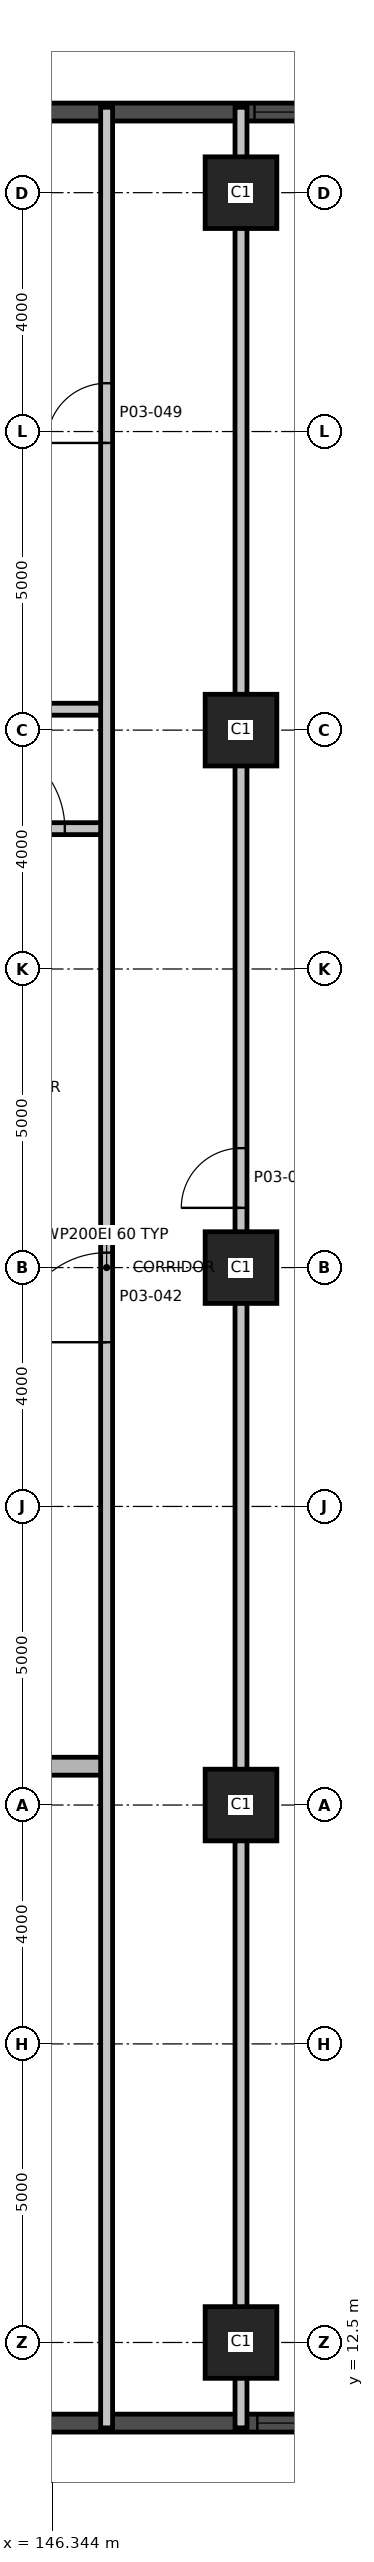
"""IFC4 building model, lengths in metres.
Left out: names, types, materials, properties, quantities, classifications, styles, units other than length and angle.
Written with IfcOpenShell. Run it as: python <this file> out.ifc"""

import sys

from ifc_helpers import new_model, si_unit, direction, frame, frame_2d, origin, origin_2d, place, context, subcontext, project, spatial, rectangle, extrude, element, fill, save


model = new_model("IFC4")
c1 = context("Model", 3, precision=1e-05, world=origin(), true_north=direction((0.0, 1.0)))
c2 = subcontext(c1, "Body", "Model", "MODEL_VIEW")
j1 = project(units=[si_unit("LENGTHUNIT", "METRE"), si_unit("PLANEANGLEUNIT", "RADIAN")], contexts=[c1])
p1 = place(None, origin())
s1 = spatial("IfcSite", under=j1, at=p1, CompositionType="ELEMENT")
p2 = place(p1, origin())
s2 = spatial("IfcBuilding", under=s1, at=p2, CompositionType="ELEMENT")
p3 = place(p2, frame((0.0, 0.0, 18.5)))
s3 = spatial("IfcBuildingStorey", under=s2, at=p3, CompositionType="ELEMENT", Elevation=18.5)
for number, where, z_axis, x_axis in (
    (1, (149.5, 12.5, 0.0), (0.0, 0.0, 1.0), (1.0, 0.0, 0.0)),
    (2, (149.5, 21.5, 0.0), (0.0, 0.0, 1.0), (1.0, 0.0, 0.0)),
    (3, (149.5, 30.5, 0.0), (0.0, 0.0, 1.0), (1.0, 0.0, 0.0)),
    (4, (149.5, 39.5, 0.0), (0.0, 0.0, 1.0), (1.0, 0.0, 0.0)),
    (5, (149.5, 48.5, 0.0), (0.0, 0.0, 1.0), (1.0, 0.0, 0.0)),
):
    element("IfcColumn", number, at=place(p3, frame(where, z_axis=z_axis, x_axis=x_axis)), inside=s3, PredefinedType="COLUMN", context=c2, shape_type="SweptSolid", body=[
        extrude(rectangle(XDim=1.2, YDim=1.2, at=origin_2d()), origin(), (0.0, 0.0, 1.0), 5.0),
    ])
p4 = place(p3, frame((118.048, 11.15, 0.0), z_axis=(0.0, 0.0, 1.0), x_axis=(1.0, 0.0, 0.0)))
e6 = element("IfcWall", 6, at=p4, inside=s3, PredefinedType="SOLIDWALL", context=c2, shape_type="SweptSolid", body=[
    extrude(rectangle(XDim=35.88, YDim=0.3, at=frame_2d((17.94, 0.0))), origin(), (0.0, 0.0, 1.0), 4.7),
])
p5 = place(p4, frame((4.202, 0.0, 0.9)))
e7 = element("IfcOpeningElement", 7, at=p5, cuts=e6, PredefinedType="OPENING", context=c2, shape_type="SweptSolid", body=[
    extrude(rectangle(XDim=3.0, YDim=2.4, at=frame_2d((1.5, 1.2))), frame((0.0, 0.16, 0.0), z_axis=(0.0, -1.0, 0.0), x_axis=(1.0, 0.0, 0.0)), (0.0, 0.0, 1.0), 0.32),
])
p6 = place(p4, frame((8.702, 0.0, 0.9)))
e8 = element("IfcOpeningElement", 8, at=p6, cuts=e6, PredefinedType="OPENING", context=c2, shape_type="SweptSolid", body=[
    extrude(rectangle(XDim=3.0, YDim=2.4, at=frame_2d((1.5, 1.2))), frame((0.0, 0.16, 0.0), z_axis=(0.0, -1.0, 0.0), x_axis=(1.0, 0.0, 0.0)), (0.0, 0.0, 1.0), 0.32),
])
p7 = place(p4, frame((13.202, 0.0, 0.9)))
e9 = element("IfcOpeningElement", 9, at=p7, cuts=e6, PredefinedType="OPENING", context=c2, shape_type="SweptSolid", body=[
    extrude(rectangle(XDim=3.0, YDim=2.4, at=frame_2d((1.5, 1.2))), frame((0.0, 0.16, 0.0), z_axis=(0.0, -1.0, 0.0), x_axis=(1.0, 0.0, 0.0)), (0.0, 0.0, 1.0), 0.32),
])
p8 = place(p4, frame((17.702, 0.0, 0.9)))
e10 = element("IfcOpeningElement", 10, at=p8, cuts=e6, PredefinedType="OPENING", context=c2, shape_type="SweptSolid", body=[
    extrude(rectangle(XDim=3.0, YDim=2.4, at=frame_2d((1.5, 1.2))), frame((0.0, 0.16, 0.0), z_axis=(0.0, -1.0, 0.0), x_axis=(1.0, 0.0, 0.0)), (0.0, 0.0, 1.0), 0.32),
])
p9 = place(p4, frame((22.202, 0.0, 0.9)))
e11 = element("IfcOpeningElement", 11, at=p9, cuts=e6, PredefinedType="OPENING", context=c2, shape_type="SweptSolid", body=[
    extrude(rectangle(XDim=3.0, YDim=2.4, at=frame_2d((1.5, 1.2))), frame((0.0, 0.16, 0.0), z_axis=(0.0, -1.0, 0.0), x_axis=(1.0, 0.0, 0.0)), (0.0, 0.0, 1.0), 0.32),
])
p10 = place(p4, frame((31.726, 0.0, 0.9)))
e12 = element("IfcOpeningElement", 12, at=p10, cuts=e6, PredefinedType="OPENING", context=c2, shape_type="SweptSolid", body=[
    extrude(rectangle(XDim=3.0, YDim=2.4, at=frame_2d((1.5, 1.2))), frame((0.0, 0.16, 0.0), z_axis=(0.0, -1.0, 0.0), x_axis=(1.0, 0.0, 0.0)), (0.0, 0.0, 1.0), 0.32),
])
p11 = place(p3, frame((153.952, 49.85, 0.0), z_axis=(0.0, 0.0, 1.0), x_axis=(-1.0, 0.0, 0.0)))
e13 = element("IfcWall", 13, at=p11, inside=s3, PredefinedType="SOLIDWALL", context=c2, shape_type="SweptSolid", body=[
    extrude(rectangle(XDim=35.88, YDim=0.3, at=frame_2d((17.94, 0.0))), origin(), (0.0, 0.0, 1.0), 4.7),
])
p12 = place(p11, frame((1.226, 0.0, 0.9)))
e14 = element("IfcOpeningElement", 14, at=p12, cuts=e13, PredefinedType="OPENING", context=c2, shape_type="SweptSolid", body=[
    extrude(rectangle(XDim=3.0, YDim=2.4, at=frame_2d((1.5, 1.2))), frame((0.0, 0.16, 0.0), z_axis=(0.0, -1.0, 0.0), x_axis=(1.0, 0.0, 0.0)), (0.0, 0.0, 1.0), 0.32),
])
p13 = place(p11, frame((15.202, 0.0, 0.9)))
e15 = element("IfcOpeningElement", 15, at=p13, cuts=e13, PredefinedType="OPENING", context=c2, shape_type="SweptSolid", body=[
    extrude(rectangle(XDim=3.0, YDim=2.4, at=frame_2d((1.5, 1.2))), frame((0.0, 0.16, 0.0), z_axis=(0.0, -1.0, 0.0), x_axis=(1.0, 0.0, 0.0)), (0.0, 0.0, 1.0), 0.32),
])
p14 = place(p11, frame((24.202, 0.0, 0.9)))
e16 = element("IfcOpeningElement", 16, at=p14, cuts=e13, PredefinedType="OPENING", context=c2, shape_type="SweptSolid", body=[
    extrude(rectangle(XDim=3.0, YDim=2.4, at=frame_2d((1.5, 1.2))), frame((0.0, 0.16, 0.0), z_axis=(0.0, -1.0, 0.0), x_axis=(1.0, 0.0, 0.0)), (0.0, 0.0, 1.0), 0.32),
])
p15 = place(p11, frame((28.702, 0.0, 0.9)))
e17 = element("IfcOpeningElement", 17, at=p15, cuts=e13, PredefinedType="OPENING", context=c2, shape_type="SweptSolid", body=[
    extrude(rectangle(XDim=3.0, YDim=2.4, at=frame_2d((1.5, 1.2))), frame((0.0, 0.16, 0.0), z_axis=(0.0, -1.0, 0.0), x_axis=(1.0, 0.0, 0.0)), (0.0, 0.0, 1.0), 0.32),
])
p16 = place(p3, frame((125.75, 22.15, 0.0), z_axis=(0.0, 0.0, 1.0), x_axis=(1.0, 0.0, 0.0)))
e18 = element("IfcWall", 18, at=p16, inside=s3, PredefinedType="SHEAR", context=c2, shape_type="SweptSolid", body=[
    extrude(rectangle(XDim=21.5, YDim=0.3, at=frame_2d((10.75, 0.0))), origin(), (0.0, 0.0, 1.0), 4.7),
])
p17 = place(p16, frame((17.0, 0.0, 0.0)))
e19 = element("IfcOpeningElement", 19, at=p17, cuts=e18, PredefinedType="OPENING", context=c2, shape_type="SweptSolid", body=[
    extrude(rectangle(XDim=1.0, YDim=2.1, at=frame_2d((0.5, 1.05))), frame((0.0, 0.16, 0.0), z_axis=(0.0, -1.0, 0.0), x_axis=(1.0, 0.0, 0.0)), (0.0, 0.0, 1.0), 0.32),
])
p18 = place(p16, frame((6.75, 0.0, 0.0)))
e20 = element("IfcOpeningElement", 20, at=p18, cuts=e18, PredefinedType="OPENING", context=c2, shape_type="SweptSolid", body=[
    extrude(rectangle(XDim=1.6, YDim=2.1, at=frame_2d((0.8, 1.05))), frame((0.0, 0.16, 0.0), z_axis=(0.0, -1.0, 0.0), x_axis=(1.0, 0.0, 0.0)), (0.0, 0.0, 1.0), 0.32),
])
p19 = place(p3, frame((144.02, 37.85, 0.0), z_axis=(0.0, 0.0, 1.0), x_axis=(1.0, 0.0, 0.0)))
e21 = element("IfcWall", 21, at=p19, inside=s3, PredefinedType="PARTITIONING", context=c2, shape_type="SweptSolid", body=[
    extrude(rectangle(XDim=3.23, YDim=0.2, at=frame_2d((1.615, 0.0))), origin(), (0.0, 0.0, 1.0), 4.7),
])
p20 = place(p19, frame((1.03, 0.0, 0.0)))
e22 = element("IfcOpeningElement", 22, at=p20, cuts=e21, PredefinedType="OPENING", context=c2, shape_type="SweptSolid", body=[
    extrude(rectangle(XDim=1.5, YDim=2.1, at=frame_2d((0.75, 1.05))), frame((0.0, 0.11, 0.0), z_axis=(0.0, -1.0, 0.0), x_axis=(1.0, 0.0, 0.0)), (0.0, 0.0, 1.0), 0.22),
])
p21 = place(p3, frame((143.0, 39.85, 0.0), z_axis=(0.0, 0.0, 1.0), x_axis=(1.0, 0.0, 0.0)))
e23 = element("IfcWall", 23, at=p21, inside=s3, PredefinedType="PARTITIONING", context=c2, shape_type="SweptSolid", body=[
    extrude(rectangle(XDim=4.25, YDim=0.2, at=frame_2d((2.125, 0.0))), origin(), (0.0, 0.0, 1.0), 4.7),
])
p22 = place(p3, frame((147.25, 11.07, 0.0), z_axis=(0.0, 0.0, 1.0), x_axis=(0.0, 1.0, 0.0)))
e24 = element("IfcWall", 24, at=p22, inside=s3, PredefinedType="PARTITIONING", context=c2, shape_type="SweptSolid", body=[
    extrude(rectangle(XDim=38.86, YDim=0.2, at=frame_2d((19.43, 0.0))), origin(), (0.0, 0.0, 1.0), 4.7),
])
p23 = place(p22, frame((18.18, 0.0, 0.0)))
e25 = element("IfcOpeningElement", 25, at=p23, cuts=e24, PredefinedType="OPENING", context=c2, shape_type="SweptSolid", body=[
    extrude(rectangle(XDim=1.5, YDim=2.1, at=frame_2d((0.75, 1.05))), frame((0.0, 0.11, 0.0), z_axis=(0.0, -1.0, 0.0), x_axis=(1.0, 0.0, 0.0)), (0.0, 0.0, 1.0), 0.22),
])
p24 = place(p22, frame((33.239, 0.0, 0.0)))
e26 = element("IfcOpeningElement", 26, at=p24, cuts=e24, PredefinedType="OPENING", context=c2, shape_type="SweptSolid", body=[
    extrude(rectangle(XDim=1.0, YDim=2.1, at=frame_2d((0.5, 1.05))), frame((0.0, 0.11, 0.0), z_axis=(0.0, -1.0, 0.0), x_axis=(1.0, 0.0, 0.0)), (0.0, 0.0, 1.0), 0.22),
])
p25 = place(p3, frame((149.5, 11.07, 0.0), z_axis=(0.0, 0.0, 1.0), x_axis=(0.0, 1.0, 0.0)))
e27 = element("IfcWall", 27, at=p25, inside=s3, PredefinedType="PARTITIONING", context=c2, shape_type="SweptSolid", body=[
    extrude(rectangle(XDim=38.86, YDim=0.2, at=frame_2d((19.43, 0.0))), origin(), (0.0, 0.0, 1.0), 4.7),
])
p26 = place(p25, frame((20.43, 0.0, 0.0)))
e28 = element("IfcOpeningElement", 28, at=p26, cuts=e27, PredefinedType="OPENING", context=c2, shape_type="SweptSolid", body=[
    extrude(rectangle(XDim=1.0, YDim=2.1, at=frame_2d((0.5, 1.05))), frame((0.0, 0.11, 0.0), z_axis=(0.0, -1.0, 0.0), x_axis=(1.0, 0.0, 0.0)), (0.0, 0.0, 1.0), 0.22),
])
p27 = place(p10, origin())
e29 = element("IfcWindow", 29, at=p27, inside=s3, PartitioningType="SINGLE_PANEL", PredefinedType="WINDOW", context=c2, shape_type="SweptSolid", body=[
    extrude(rectangle(XDim=3.0, YDim=2.4, at=frame_2d((1.5, 1.2))), frame((0.0, 0.03, 0.0), z_axis=(0.0, -1.0, 0.0), x_axis=(1.0, 0.0, 0.0)), (0.0, 0.0, 1.0), 0.06),
])
fill(e12, e29)
p28 = place(p12, origin())
e30 = element("IfcWindow", 30, at=p28, inside=s3, PartitioningType="SINGLE_PANEL", PredefinedType="WINDOW", context=c2, shape_type="SweptSolid", body=[
    extrude(rectangle(XDim=3.0, YDim=2.4, at=frame_2d((1.5, 1.2))), frame((0.0, 0.03, 0.0), z_axis=(0.0, -1.0, 0.0), x_axis=(1.0, 0.0, 0.0)), (0.0, 0.0, 1.0), 0.06),
])
fill(e14, e30)
p29 = place(p20, origin())
e31 = element("IfcDoor", 31, at=p29, inside=s3, OperationType="SINGLE_SWING_LEFT", PredefinedType="DOOR", context=c2, shape_type="SweptSolid", body=[
    extrude(rectangle(XDim=1.5, YDim=2.1, at=frame_2d((0.75, 1.05))), frame((0.0, 0.025, 0.0), z_axis=(0.0, -1.0, 0.0), x_axis=(1.0, 0.0, 0.0)), (0.0, 0.0, 1.0), 0.05),
])
fill(e22, e31)
p30 = place(p23, origin())
e32 = element("IfcDoor", 32, at=p30, inside=s3, OperationType="SINGLE_SWING_RIGHT", PredefinedType="DOOR", context=c2, shape_type="SweptSolid", body=[
    extrude(rectangle(XDim=1.5, YDim=2.1, at=frame_2d((0.75, 1.05))), frame((0.0, 0.025, 0.0), z_axis=(0.0, -1.0, 0.0), x_axis=(1.0, 0.0, 0.0)), (0.0, 0.0, 1.0), 0.05),
])
fill(e25, e32)
p31 = place(p26, origin())
e33 = element("IfcDoor", 33, at=p31, inside=s3, OperationType="SINGLE_SWING_LEFT", PredefinedType="DOOR", context=c2, shape_type="SweptSolid", body=[
    extrude(rectangle(XDim=1.0, YDim=2.1, at=frame_2d((0.5, 1.05))), frame((0.0, 0.025, 0.0), z_axis=(0.0, -1.0, 0.0), x_axis=(1.0, 0.0, 0.0)), (0.0, 0.0, 1.0), 0.05),
])
fill(e28, e33)
p32 = place(p24, origin())
e34 = element("IfcDoor", 34, at=p32, inside=s3, OperationType="SINGLE_SWING_LEFT", PredefinedType="DOOR", context=c2, shape_type="SweptSolid", body=[
    extrude(rectangle(XDim=1.0, YDim=2.1, at=frame_2d((0.5, 1.05))), frame((0.0, 0.025, 0.0), z_axis=(0.0, -1.0, 0.0), x_axis=(1.0, 0.0, 0.0)), (0.0, 0.0, 1.0), 0.05),
])
fill(e26, e34)
save(model, sys.argv[1])
